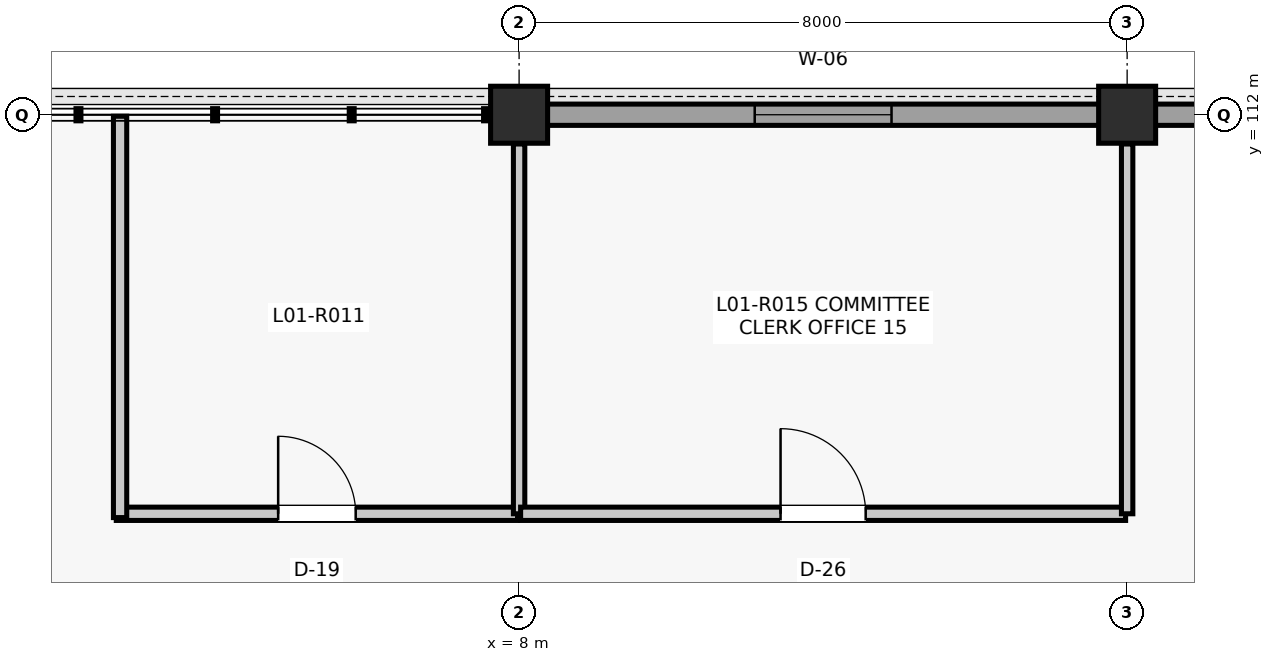
"""IFC4 building model, lengths in metres.
Left out: names, types, materials, properties, quantities, classifications, styles, units other than length and angle.
Written with IfcOpenShell. Run it as: python <this file> out.ifc"""

import sys

from ifc_helpers import new_model, si_unit, direction, frame, frame_2d, origin, origin_2d, place, context, subcontext, project, spatial, rectangle, extrude, element, fill, save


model = new_model("IFC4")
c1 = context("Model", 3, precision=1e-05, world=origin(), true_north=direction((0.0, 1.0)))
c2 = subcontext(c1, "Body", "Model", "MODEL_VIEW")
j1 = project(units=[si_unit("LENGTHUNIT", "METRE"), si_unit("PLANEANGLEUNIT", "RADIAN")], contexts=[c1])
p1 = place(None, origin())
s1 = spatial("IfcSite", under=j1, at=p1, CompositionType="ELEMENT")
p2 = place(p1, origin())
s2 = spatial("IfcBuilding", under=s1, at=p2, CompositionType="ELEMENT")
p3 = place(p2, frame((0.0, 0.0, 5.28)))
s3 = spatial("IfcBuildingStorey", under=s2, at=p3, CompositionType="ELEMENT", Elevation=5.28)
for number, where, z_axis, x_axis in (
    (1, (8.0, 112.0, 0.0), (0.0, 0.0, 1.0), (1.0, 0.0, 0.0)),
    (2, (16.0, 112.0, 0.0), (0.0, 0.0, 1.0), (1.0, 0.0, 0.0)),
):
    element("IfcColumn", number, at=place(p3, frame(where, z_axis=z_axis, x_axis=x_axis)), inside=s3, PredefinedType="COLUMN", context=c2, shape_type="SweptSolid", body=[
        extrude(rectangle(XDim=0.75, YDim=0.75, at=origin_2d()), origin(), (0.0, 0.0, 1.0), 4.62),
    ])
p4 = place(p3, frame((8.36, 112.0, 0.0), z_axis=(0.0, 0.0, 1.0), x_axis=(1.0, 0.0, 0.0)))
e3 = element("IfcWall", 3, at=p4, inside=s3, PredefinedType="SOLIDWALL", context=c2, shape_type="SweptSolid", body=[
    extrude(rectangle(XDim=7.28, YDim=0.28, at=frame_2d((3.64, 0.0))), origin(), (0.0, 0.0, 1.0), 3.91),
])
p5 = place(p4, frame((2.74, 0.0, 0.9)))
e4 = element("IfcOpeningElement", 4, at=p5, cuts=e3, PredefinedType="OPENING", context=c2, shape_type="SweptSolid", body=[
    extrude(rectangle(XDim=1.8, YDim=2.3, at=frame_2d((0.9, 1.15))), frame((0.0, 0.15, 0.0), z_axis=(0.0, -1.0, 0.0), x_axis=(1.0, 0.0, 0.0)), (0.0, 0.0, 1.0), 0.3),
])
p6 = place(p3, frame((16.36, 112.0, 0.0), z_axis=(0.0, 0.0, 1.0), x_axis=(1.0, 0.0, 0.0)))
e5 = element("IfcWall", 5, at=p6, inside=s3, PredefinedType="SOLIDWALL", context=c2, shape_type="SweptSolid", body=[
    extrude(rectangle(XDim=7.28, YDim=0.28, at=frame_2d((3.64, 0.0))), origin(), (0.0, 0.0, 1.0), 3.974),
])
p7 = place(p6, frame((0.71, 0.0, 0.95)))
e6 = element("IfcOpeningElement", 6, at=p7, cuts=e5, PredefinedType="OPENING", context=c2, shape_type="SweptSolid", body=[
    extrude(rectangle(XDim=1.2, YDim=1.8, at=frame_2d((0.6, 0.9))), frame((0.0, 0.15, 0.0), z_axis=(0.0, -1.0, 0.0), x_axis=(1.0, 0.0, 0.0)), (0.0, 0.0, 1.0), 0.3),
])
p8 = place(p6, frame((5.37, 0.0, 0.95)))
e7 = element("IfcOpeningElement", 7, at=p8, cuts=e5, PredefinedType="OPENING", context=c2, shape_type="SweptSolid", body=[
    extrude(rectangle(XDim=1.2, YDim=1.8, at=frame_2d((0.6, 0.9))), frame((0.0, 0.15, 0.0), z_axis=(0.0, -1.0, 0.0), x_axis=(1.0, 0.0, 0.0)), (0.0, 0.0, 1.0), 0.3),
])
p9 = place(p3, frame((2.7, 106.75, 0.0), z_axis=(0.0, 0.0, 1.0), x_axis=(1.0, 0.0, 0.0)))
e8 = element("IfcWall", 8, at=p9, inside=s3, PredefinedType="PARTITIONING", context=c2, shape_type="SweptSolid", body=[
    extrude(rectangle(XDim=5.28, YDim=0.175, at=frame_2d((2.64, 0.0))), origin(), (0.0, 0.0, 1.0), 3.781),
])
p10 = place(p9, frame((2.13, 0.0, 0.0)))
e9 = element("IfcOpeningElement", 9, at=p10, cuts=e8, PredefinedType="OPENING", context=c2, shape_type="SweptSolid", body=[
    extrude(rectangle(XDim=1.02, YDim=2.2, at=frame_2d((0.51, 1.1))), frame((0.0, 0.097, 0.0), z_axis=(0.0, -1.0, 0.0), x_axis=(1.0, 0.0, 0.0)), (0.0, 0.0, 1.0), 0.195),
])
p11 = place(p3, frame((2.75, 106.7, 0.0), z_axis=(0.0, 0.0, 1.0), x_axis=(0.0, 1.0, 0.0)))
e10 = element("IfcWall", 10, at=p11, inside=s3, PredefinedType="PARTITIONING", context=c2, shape_type="SweptSolid", body=[
    extrude(rectangle(XDim=5.28, YDim=0.175, at=frame_2d((2.64, 0.0))), origin(), (0.0, 0.0, 1.0), 3.913),
])
p12 = place(p3, frame((8.0, 106.75, 0.0), z_axis=(0.0, 0.0, 1.0), x_axis=(0.0, 1.0, 0.0)))
e11 = element("IfcWall", 11, at=p12, inside=s3, PredefinedType="PARTITIONING", context=c2, shape_type="SweptSolid", body=[
    extrude(rectangle(XDim=4.865, YDim=0.15, at=frame_2d((2.433, 0.0))), origin(), (0.0, 0.0, 1.0), 3.781),
])
p13 = place(p3, frame((8.02, 106.75, 0.0), z_axis=(0.0, 0.0, 1.0), x_axis=(1.0, 0.0, 0.0)))
e12 = element("IfcWall", 12, at=p13, inside=s3, PredefinedType="PARTITIONING", context=c2, shape_type="SweptSolid", body=[
    extrude(rectangle(XDim=7.96, YDim=0.175, at=frame_2d((3.98, 0.0))), origin(), (0.0, 0.0, 1.0), 3.781),
])
p14 = place(p13, frame((3.42, 0.0, 0.0)))
e13 = element("IfcOpeningElement", 13, at=p14, cuts=e12, PredefinedType="OPENING", context=c2, shape_type="SweptSolid", body=[
    extrude(rectangle(XDim=1.12, YDim=2.22, at=frame_2d((0.56, 1.11))), frame((0.0, 0.097, 0.0), z_axis=(0.0, -1.0, 0.0), x_axis=(1.0, 0.0, 0.0)), (0.0, 0.0, 1.0), 0.195),
])
p15 = place(p3, frame((16.0, 106.75, 0.0), z_axis=(0.0, 0.0, 1.0), x_axis=(0.0, 1.0, 0.0)))
e14 = element("IfcWall", 14, at=p15, inside=s3, PredefinedType="PARTITIONING", context=c2, shape_type="SweptSolid", body=[
    extrude(rectangle(XDim=4.865, YDim=0.15, at=frame_2d((2.433, 0.0))), origin(), (0.0, 0.0, 1.0), 3.851),
])
p16 = place(p5, origin())
e15 = element("IfcWindow", 15, at=p16, inside=s3, PartitioningType="SINGLE_PANEL", PredefinedType="WINDOW", context=c2, shape_type="SweptSolid", body=[
    extrude(rectangle(XDim=1.8, YDim=2.3, at=frame_2d((0.9, 1.15))), frame((0.0, 0.03, 0.0), z_axis=(0.0, -1.0, 0.0), x_axis=(1.0, 0.0, 0.0)), (0.0, 0.0, 1.0), 0.06),
])
fill(e4, e15)
p17 = place(p10, origin())
e16 = element("IfcDoor", 16, at=p17, inside=s3, OperationType="SINGLE_SWING_LEFT", PredefinedType="DOOR", context=c2, shape_type="SweptSolid", body=[
    extrude(rectangle(XDim=1.02, YDim=2.2, at=frame_2d((0.51, 1.1))), frame((0.0, 0.025, 0.0), z_axis=(0.0, -1.0, 0.0), x_axis=(1.0, 0.0, 0.0)), (0.0, 0.0, 1.0), 0.05),
])
fill(e9, e16)
p18 = place(p14, origin())
e17 = element("IfcDoor", 17, at=p18, inside=s3, OperationType="SINGLE_SWING_LEFT", PredefinedType="DOOR", context=c2, shape_type="SweptSolid", body=[
    extrude(rectangle(XDim=1.12, YDim=2.22, at=frame_2d((0.56, 1.11))), frame((0.0, 0.025, 0.0), z_axis=(0.0, -1.0, 0.0), x_axis=(1.0, 0.0, 0.0)), (0.0, 0.0, 1.0), 0.05),
])
fill(e13, e17)
save(model, sys.argv[1])
